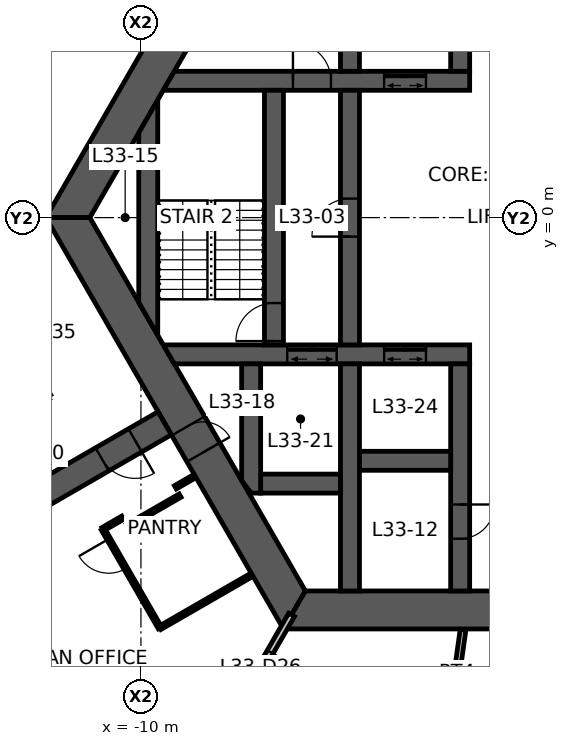
"""IFC4 building model, lengths in metres.
Left out: names, types, materials, properties, quantities, classifications, styles, units other than length and angle.
Written with IfcOpenShell. Run it as: python <this file> out.ifc"""

import sys

from ifc_helpers import new_model, si_unit, direction, frame, frame_2d, origin, place, context, subcontext, project, spatial, polyline, rectangle, outline, extrude, element, fill, save


model = new_model("IFC4")
c1 = context("Model", 3, precision=1e-05, world=origin(), true_north=direction((0.0, 1.0)))
c2 = subcontext(c1, "Body", "Model", "MODEL_VIEW")
j1 = project(units=[si_unit("LENGTHUNIT", "METRE"), si_unit("PLANEANGLEUNIT", "RADIAN")], contexts=[c1])
p1 = place(None, origin())
s1 = spatial("IfcSite", under=j1, at=p1, CompositionType="ELEMENT")
p2 = place(p1, origin())
s2 = spatial("IfcBuilding", under=s1, at=p2, CompositionType="ELEMENT")
p3 = place(p2, frame((0.0, 0.0, 133.1)))
s3 = spatial("IfcBuildingStorey", under=s2, at=p3, CompositionType="ELEMENT", Elevation=133.1)
p4 = place(p3, frame((-5.961, 10.325, 0.0), z_axis=(0.0, 0.0, 1.0), x_axis=(-0.500004296715, -0.866022923061, 0.0)))
e1 = element("IfcWall", 1, at=p4, inside=s3, PredefinedType="SHEAR", context=c2, shape_type="SweptSolid", body=[
    extrude(outline(polyline([(-0.289, -0.5), (4.494, -0.5), (5.494, -0.5), (12.211, -0.5), (11.634, 0.5), (5.494, 0.5), (4.494, 0.5), (0.289, 0.5), (-0.289, -0.5)])), origin(), (0.0, 0.0, 1.0), 3.9),
])
p5 = place(p4, frame((4.494, 0.0, 0.0)))
e2 = element("IfcOpeningElement", 2, at=p5, cuts=e1, PredefinedType="OPENING", context=c2, shape_type="SweptSolid", body=[
    extrude(rectangle(XDim=1.0, YDim=2.1, at=frame_2d((0.5, 1.05))), frame((0.0, 0.51, 0.0), z_axis=(0.0, -1.0, 0.0), x_axis=(1.0, 0.0, 0.0)), (0.0, 0.0, 1.0), 1.02),
])
p6 = place(p3, frame((-11.922, 0.0, 0.0), z_axis=(0.0, 0.0, 1.0), x_axis=(0.500004296715, -0.866022923061, 0.0)))
e3 = element("IfcWall", 3, at=p6, inside=s3, PredefinedType="SHEAR", context=c2, shape_type="SweptSolid", body=[
    extrude(outline(polyline([(-0.289, -0.5), (6.331, -0.5), (7.131, -0.5), (12.211, -0.5), (11.634, 0.5), (7.131, 0.5), (6.331, 0.5), (0.289, 0.5), (-0.289, -0.5)])), origin(), (0.0, 0.0, 1.0), 3.9),
])
p7 = place(p6, frame((6.331, 0.0, 0.0)))
e4 = element("IfcOpeningElement", 4, at=p7, cuts=e3, PredefinedType="OPENING", context=c2, shape_type="SweptSolid", body=[
    extrude(rectangle(XDim=0.8, YDim=2.1, at=frame_2d((0.4, 1.05))), frame((0.0, 0.51, 0.0), z_axis=(0.0, -1.0, 0.0), x_axis=(1.0, 0.0, 0.0)), (0.0, 0.0, 1.0), 1.02),
])
p8 = place(p3, frame((-5.961, -10.325, 0.0), z_axis=(0.0, 0.0, 1.0), x_axis=(1.0, 0.0, 0.0)))
e5 = element("IfcWall", 5, at=p8, inside=s3, PredefinedType="SHEAR", context=c2, shape_type="SweptSolid", body=[
    extrude(outline(polyline([(-0.289, -0.5), (5.461, -0.5), (6.461, -0.5), (12.211, -0.5), (11.634, 0.5), (6.461, 0.5), (5.461, 0.5), (0.289, 0.5), (-0.289, -0.5)])), origin(), (0.0, 0.0, 1.0), 3.9),
])
p9 = place(p8, frame((5.461, 0.0, 0.0)))
e6 = element("IfcOpeningElement", 6, at=p9, cuts=e5, PredefinedType="OPENING", context=c2, shape_type="SweptSolid", body=[
    extrude(rectangle(XDim=1.0, YDim=2.1, at=frame_2d((0.5, 1.05))), frame((0.0, 0.51, 0.0), z_axis=(0.0, -1.0, 0.0), x_axis=(1.0, 0.0, 0.0)), (0.0, 0.0, 1.0), 1.02),
])
p10 = place(p3, frame((-9.375, -5.413, 0.0), z_axis=(0.0, 0.0, 1.0), x_axis=(-0.866032377459, -0.499987921047, 0.0)))
e7 = element("IfcWall", 7, at=p10, inside=s3, PredefinedType="SHEAR", context=c2, shape_type="SweptSolid", body=[
    extrude(rectangle(XDim=7.696, YDim=0.7, at=frame_2d((3.848, 0.0))), origin(), (0.0, 0.0, 1.0), 3.9),
])
p11 = place(p10, frame((0.9, 0.0, 0.0)))
e8 = element("IfcOpeningElement", 8, at=p11, cuts=e7, PredefinedType="OPENING", context=c2, shape_type="SweptSolid", body=[
    extrude(rectangle(XDim=1.0, YDim=2.1, at=frame_2d((0.5, 1.05))), frame((0.0, 0.36, 0.0), z_axis=(0.0, -1.0, 0.0), x_axis=(1.0, 0.0, 0.0)), (0.0, 0.0, 1.0), 0.72),
])
p12 = place(p3, frame((-9.266, 3.6, 0.0), z_axis=(0.0, 0.0, 1.0), x_axis=(1.0, 0.0, 0.0)))
e9 = element("IfcWall", 9, at=p12, inside=s3, PredefinedType="SHEAR", context=c2, shape_type="SweptSolid", body=[
    extrude(outline(polyline([(-0.144, -0.25), (3.266, -0.25), (4.266, -0.25), (5.667, -0.25), (6.767, -0.25), (7.916, -0.25), (7.916, 0.25), (6.767, 0.25), (5.667, 0.25), (4.266, 0.25), (3.266, 0.25), (0.144, 0.25), (-0.144, -0.25)])), origin(), (0.0, 0.0, 1.0), 3.9),
])
p13 = place(p12, frame((3.266, 0.0, 0.0)))
e10 = element("IfcOpeningElement", 10, at=p13, cuts=e9, PredefinedType="OPENING", context=c2, shape_type="SweptSolid", body=[
    extrude(rectangle(XDim=1.0, YDim=2.1, at=frame_2d((0.5, 1.05))), frame((0.0, 0.26, 0.0), z_axis=(0.0, -1.0, 0.0), x_axis=(1.0, 0.0, 0.0)), (0.0, 0.0, 1.0), 0.52),
])
p14 = place(p12, frame((5.667, 0.0, 0.0)))
e11 = element("IfcOpeningElement", 11, at=p14, cuts=e9, PredefinedType="OPENING", context=c2, shape_type="SweptSolid", body=[
    extrude(rectangle(XDim=1.1, YDim=2.1, at=frame_2d((0.55, 1.05))), frame((0.0, 0.26, 0.0), z_axis=(0.0, -1.0, 0.0), x_axis=(1.0, 0.0, 0.0)), (0.0, 0.0, 1.0), 0.52),
])
p15 = place(p3, frame((-9.266, -3.6, 0.0), z_axis=(0.0, 0.0, 1.0), x_axis=(1.0, 0.0, 0.0)))
e12 = element("IfcWall", 12, at=p15, inside=s3, PredefinedType="SHEAR", context=c2, shape_type="SweptSolid", body=[
    extrude(outline(polyline([(0.144, -0.25), (3.116, -0.25), (4.417, -0.25), (5.667, -0.25), (6.767, -0.25), (7.916, -0.25), (7.916, 0.25), (6.767, 0.25), (5.667, 0.25), (4.417, 0.25), (3.116, 0.25), (-0.144, 0.25), (0.144, -0.25)])), origin(), (0.0, 0.0, 1.0), 3.9),
])
p16 = place(p15, frame((5.667, 0.0, 0.0)))
e13 = element("IfcOpeningElement", 13, at=p16, cuts=e12, PredefinedType="OPENING", context=c2, shape_type="SweptSolid", body=[
    extrude(rectangle(XDim=1.1, YDim=2.1, at=frame_2d((0.55, 1.05))), frame((0.0, 0.26, 0.0), z_axis=(0.0, -1.0, 0.0), x_axis=(1.0, 0.0, 0.0)), (0.0, 0.0, 1.0), 0.52),
])
p17 = place(p15, frame((3.116, 0.0, 0.0)))
e14 = element("IfcOpeningElement", 14, at=p17, cuts=e12, PredefinedType="OPENING", context=c2, shape_type="SweptSolid", body=[
    extrude(rectangle(XDim=1.3, YDim=2.1, at=frame_2d((0.65, 1.05))), frame((0.0, 0.26, 0.0), z_axis=(0.0, -1.0, 0.0), x_axis=(1.0, 0.0, 0.0)), (0.0, 0.0, 1.0), 0.52),
])
p18 = place(p3, frame((-1.6, 3.85, 0.0), z_axis=(0.0, 0.0, 1.0), x_axis=(0.0, 1.0, 0.0)))
e15 = element("IfcWall", 15, at=p18, inside=s3, PredefinedType="SHEAR", context=c2, shape_type="SweptSolid", body=[
    extrude(rectangle(XDim=5.975, YDim=0.5, at=frame_2d((2.987, 0.0))), origin(), (0.0, 0.0, 1.0), 3.9),
])
p19 = place(p18, frame((3.7, 0.0, 0.0)))
e16 = element("IfcOpeningElement", 16, at=p19, cuts=e15, PredefinedType="OPENING", context=c2, shape_type="SweptSolid", body=[
    extrude(rectangle(XDim=0.9, YDim=2.1, at=frame_2d((0.45, 1.05))), frame((0.0, 0.26, 0.0), z_axis=(0.0, -1.0, 0.0), x_axis=(1.0, 0.0, 0.0)), (0.0, 0.0, 1.0), 0.52),
])
p20 = place(p3, frame((-1.6, -3.85, 0.0), z_axis=(0.0, 0.0, 1.0), x_axis=(0.0, -1.0, 0.0)))
e17 = element("IfcWall", 17, at=p20, inside=s3, PredefinedType="SHEAR", context=c2, shape_type="SweptSolid", body=[
    extrude(rectangle(XDim=5.975, YDim=0.5, at=frame_2d((2.987, 0.0))), origin(), (0.0, 0.0, 1.0), 3.9),
])
p21 = place(p20, frame((3.7, 0.0, 0.0)))
e18 = element("IfcOpeningElement", 18, at=p21, cuts=e17, PredefinedType="OPENING", context=c2, shape_type="SweptSolid", body=[
    extrude(rectangle(XDim=0.9, YDim=2.1, at=frame_2d((0.45, 1.05))), frame((0.0, 0.26, 0.0), z_axis=(0.0, -1.0, 0.0), x_axis=(1.0, 0.0, 0.0)), (0.0, 0.0, 1.0), 0.52),
])
p22 = place(p3, frame((-4.5, -3.35, 0.0), z_axis=(0.0, 0.0, 1.0), x_axis=(0.0, 1.0, 0.0)))
e19 = element("IfcWall", 19, at=p22, inside=s3, PredefinedType="SHEAR", context=c2, shape_type="SweptSolid", body=[
    extrude(rectangle(XDim=6.7, YDim=0.5, at=frame_2d((3.35, 0.0))), origin(), (0.0, 0.0, 1.0), 3.9),
])
p23 = place(p22, frame((2.85, 0.0, 0.0)))
e20 = element("IfcOpeningElement", 20, at=p23, cuts=e19, PredefinedType="OPENING", context=c2, shape_type="SweptSolid", body=[
    extrude(rectangle(XDim=1.0, YDim=2.1, at=frame_2d((0.5, 1.05))), frame((0.0, 0.26, 0.0), z_axis=(0.0, -1.0, 0.0), x_axis=(1.0, 0.0, 0.0)), (0.0, 0.0, 1.0), 0.52),
])
p24 = place(p3, frame((-6.5, -3.35, 0.0), z_axis=(0.0, 0.0, 1.0), x_axis=(0.0, 1.0, 0.0)))
e21 = element("IfcWall", 21, at=p24, inside=s3, PredefinedType="SHEAR", context=c2, shape_type="SweptSolid", body=[
    extrude(rectangle(XDim=6.7, YDim=0.5, at=frame_2d((3.35, 0.0))), origin(), (0.0, 0.0, 1.0), 3.9),
])
p25 = place(p24, frame((0.1, 0.0, 0.0)))
e22 = element("IfcOpeningElement", 22, at=p25, cuts=e21, PredefinedType="OPENING", context=c2, shape_type="SweptSolid", body=[
    extrude(rectangle(XDim=1.0, YDim=2.1, at=frame_2d((0.5, 1.05))), frame((0.0, 0.26, 0.0), z_axis=(0.0, -1.0, 0.0), x_axis=(1.0, 0.0, 0.0)), (0.0, 0.0, 1.0), 0.52),
])
for number, where, z_axis, x_axis in (
    (23, (-4.5, 3.85, 0.0), (0.0, 0.0, 1.0), (0.0, 1.0, 0.0)),
    (24, (-4.5, -3.85, 0.0), (0.0, 0.0, 1.0), (0.0, -1.0, 0.0)),
):
    element("IfcWall", number, at=place(p3, frame(where, z_axis=z_axis, x_axis=x_axis)), inside=s3, PredefinedType="SHEAR", context=c2, shape_type="SweptSolid", body=[
        extrude(rectangle(XDim=5.975, YDim=0.5, at=frame_2d((2.987, 0.0))), origin(), (0.0, 0.0, 1.0), 3.9),
    ])
p26 = place(p3, frame((-4.25, -6.4, 0.0), z_axis=(0.0, 0.0, 1.0), x_axis=(1.0, 0.0, 0.0)))
e25 = element("IfcWall", 25, at=p26, inside=s3, PredefinedType="SHEAR", context=c2, shape_type="SweptSolid", body=[
    extrude(rectangle(XDim=2.4, YDim=0.5, at=frame_2d((1.2, 0.0))), origin(), (0.0, 0.0, 1.0), 3.9),
])
p27 = place(p3, frame((-6.85, -7.0, 0.0), z_axis=(0.0, 0.0, 1.0), x_axis=(1.0, 0.0, 0.0)))
e26 = element("IfcWall", 26, at=p27, inside=s3, PredefinedType="SHEAR", context=c2, shape_type="SweptSolid", body=[
    extrude(rectangle(XDim=2.1, YDim=0.5, at=frame_2d((1.05, 0.0))), origin(), (0.0, 0.0, 1.0), 3.9),
])
p28 = place(p3, frame((-7.1, -3.85, 0.0), z_axis=(0.0, 0.0, 1.0), x_axis=(0.0, -1.0, 0.0)))
e27 = element("IfcWall", 27, at=p28, inside=s3, PredefinedType="SHEAR", context=c2, shape_type="SweptSolid", body=[
    extrude(outline(polyline([(0.0, -0.25), (3.069, -0.25), (3.4, 0.0), (3.4, 0.25), (0.0, 0.25), (0.0, -0.25)])), origin(), (0.0, 0.0, 1.0), 3.9),
])
p29 = place(p3, frame((-9.808, -2.662, 0.0), z_axis=(0.0, 0.0, 1.0), x_axis=(0.0, 1.0, 0.0)))
e28 = element("IfcWall", 28, at=p29, inside=s3, PredefinedType="SHEAR", context=c2, shape_type="SweptSolid", body=[
    extrude(outline(polyline([(-0.433, -0.25), (5.758, -0.25), (4.892, 0.25), (0.433, 0.25), (-0.433, -0.25)])), origin(), (0.0, 0.0, 1.0), 3.9),
])
p30 = place(p3, frame((-6.035, -10.453, 0.0), z_axis=(0.0, 0.0, 1.0), x_axis=(-0.499989830942, -0.866031274813, 0.0)))
e29 = element("IfcWall", 29, at=p30, inside=s3, PredefinedType="PARTITIONING", context=c2, shape_type="SweptSolid", body=[
    extrude(rectangle(XDim=7.93, YDim=0.175, at=frame_2d((3.965, 0.0))), origin(), (0.0, 0.0, 1.0), 3.05),
])
p31 = place(p30, frame((1.13, 0.0, 0.0)))
e30 = element("IfcOpeningElement", 30, at=p31, cuts=e29, PredefinedType="OPENING", context=c2, shape_type="SweptSolid", body=[
    extrude(rectangle(XDim=1.0, YDim=2.1, at=frame_2d((0.5, 1.05))), frame((0.0, 0.098, 0.0), z_axis=(0.0, -1.0, 0.0), x_axis=(1.0, 0.0, 0.0)), (0.0, 0.0, 1.0), 0.195),
])
p32 = place(p3, frame((-12.908, 3.893, 0.0), z_axis=(0.0, 0.0, 1.0), x_axis=(0.500006411147, 0.866021702275, 0.0)))
e31 = element("IfcWall", 31, at=p32, inside=s3, PredefinedType="PARTITIONING", context=c2, shape_type="SweptSolid", body=[
    extrude(rectangle(XDim=7.095, YDim=0.15, at=frame_2d((3.548, 0.0))), origin(), (0.0, 0.0, 1.0), 2.95),
])
p33 = place(p32, frame((3.047, 0.0, 0.0)))
e32 = element("IfcOpeningElement", 32, at=p33, cuts=e31, PredefinedType="OPENING", context=c2, shape_type="SweptSolid", body=[
    extrude(rectangle(XDim=1.0, YDim=2.1, at=frame_2d((0.5, 1.05))), frame((0.0, 0.085, 0.0), z_axis=(0.0, -1.0, 0.0), x_axis=(1.0, 0.0, 0.0)), (0.0, 0.0, 1.0), 0.17),
])
p34 = place(p3, frame((-11.0, -8.198, 0.0), z_axis=(0.0, 0.0, 1.0), x_axis=(0.866131372301, 0.499816412211, 0.0)))
e33 = element("IfcWall", 33, at=p34, inside=s3, PredefinedType="PARTITIONING", context=c2, shape_type="SweptSolid", body=[
    extrude(rectangle(XDim=0.6, YDim=0.1, at=frame_2d((0.3, 0.0))), origin(), (0.0, 0.0, 1.0), 2.95),
])
p35 = place(p3, frame((-10.355, -8.115, 0.0), z_axis=(0.0, 0.0, 1.0), x_axis=(0.866094119867, 0.499880961361, 0.0)))
e34 = element("IfcWall", 34, at=p35, inside=s3, PredefinedType="PARTITIONING", context=c2, shape_type="SweptSolid", body=[
    extrude(rectangle(XDim=1.6, YDim=0.1, at=frame_2d((0.8, 0.0))), origin(), (0.0, 0.0, 1.0), 2.95),
])
p36 = place(p3, frame((-9.5, -10.796, 0.0), z_axis=(0.0, 0.0, 1.0), x_axis=(-0.499990139034, 0.866031096941, 0.0)))
e35 = element("IfcWall", 35, at=p36, inside=s3, PredefinedType="PARTITIONING", context=c2, shape_type="SweptSolid", body=[
    extrude(rectangle(XDim=3.0, YDim=0.1, at=frame_2d((1.5, 0.0))), origin(), (0.0, 0.0, 1.0), 2.95),
])
p37 = place(p36, frame((1.8, 0.0, 0.0)))
e36 = element("IfcOpeningElement", 36, at=p37, cuts=e35, PredefinedType="OPENING", context=c2, shape_type="SweptSolid", body=[
    extrude(rectangle(XDim=0.9, YDim=2.1, at=frame_2d((0.45, 1.05))), frame((0.0, 0.06, 0.0), z_axis=(0.0, -1.0, 0.0), x_axis=(1.0, 0.0, 0.0)), (0.0, 0.0, 1.0), 0.12),
])
p38 = place(p3, frame((-9.094, -7.098, 0.0), z_axis=(0.0, 0.0, 1.0), x_axis=(0.865954211699, 0.50012328804, 0.0)))
e37 = element("IfcWall", 37, at=p38, inside=s3, PredefinedType="PARTITIONING", context=c2, shape_type="SweptSolid", body=[
    extrude(rectangle(XDim=0.58, YDim=0.1, at=frame_2d((0.29, 0.0))), origin(), (0.0, 0.0, 1.0), 2.95),
])
p39 = place(p3, frame((-7.092, -9.406, 0.0), z_axis=(0.0, 0.0, 1.0), x_axis=(-0.86603494908, -0.499983466698, 0.0)))
e38 = element("IfcWall", 38, at=p39, inside=s3, PredefinedType="PARTITIONING", context=c2, shape_type="SweptSolid", body=[
    extrude(rectangle(XDim=2.78, YDim=0.1, at=frame_2d((1.39, 0.0))), origin(), (0.0, 0.0, 1.0), 2.95),
])
p40 = place(p3, frame((-1.844, -13.125, 0.0), z_axis=(0.0, 0.0, 1.0), x_axis=(0.139119980631, 0.990275532864, 0.0)))
e39 = element("IfcWall", 39, at=p40, inside=s3, PredefinedType="PARTITIONING", context=c2, shape_type="SweptSolid", body=[
    extrude(rectangle(XDim=2.302, YDim=0.15, at=frame_2d((1.151, 0.0))), origin(), (0.0, 0.0, 1.0), 2.95),
])
p41 = place(p7, origin())
e40 = element("IfcDoor", 40, at=p41, inside=s3, OperationType="SINGLE_SWING_RIGHT", PredefinedType="DOOR", context=c2, shape_type="SweptSolid", body=[
    extrude(rectangle(XDim=0.8, YDim=2.1, at=frame_2d((0.4, 1.05))), frame((0.0, 0.025, 0.0), z_axis=(0.0, -1.0, 0.0), x_axis=(1.0, 0.0, 0.0)), (0.0, 0.0, 1.0), 0.05),
])
fill(e4, e40)
p42 = place(p23, origin())
e41 = element("IfcDoor", 41, at=p42, inside=s3, OperationType="SINGLE_SWING_LEFT", PredefinedType="DOOR", context=c2, shape_type="SweptSolid", body=[
    extrude(rectangle(XDim=1.0, YDim=2.1, at=frame_2d((0.5, 1.05))), frame((0.0, 0.025, 0.0), z_axis=(0.0, -1.0, 0.0), x_axis=(1.0, 0.0, 0.0)), (0.0, 0.0, 1.0), 0.05),
])
fill(e20, e41)
p43 = place(p25, origin())
e42 = element("IfcDoor", 42, at=p43, inside=s3, OperationType="SINGLE_SWING_LEFT", PredefinedType="DOOR", context=c2, shape_type="SweptSolid", body=[
    extrude(rectangle(XDim=1.0, YDim=2.1, at=frame_2d((0.5, 1.05))), frame((0.0, 0.025, 0.0), z_axis=(0.0, -1.0, 0.0), x_axis=(1.0, 0.0, 0.0)), (0.0, 0.0, 1.0), 0.05),
])
fill(e22, e42)
p44 = place(p13, origin())
e43 = element("IfcDoor", 43, at=p44, inside=s3, OperationType="SINGLE_SWING_LEFT", PredefinedType="DOOR", context=c2, shape_type="SweptSolid", body=[
    extrude(rectangle(XDim=1.0, YDim=2.1, at=frame_2d((0.5, 1.05))), frame((0.0, 0.025, 0.0), z_axis=(0.0, -1.0, 0.0), x_axis=(1.0, 0.0, 0.0)), (0.0, 0.0, 1.0), 0.05),
])
fill(e10, e43)
p45 = place(p21, origin())
e44 = element("IfcDoor", 44, at=p45, inside=s3, OperationType="SINGLE_SWING_LEFT", PredefinedType="DOOR", context=c2, shape_type="SweptSolid", body=[
    extrude(rectangle(XDim=0.9, YDim=2.1, at=frame_2d((0.45, 1.05))), frame((0.0, 0.025, 0.0), z_axis=(0.0, -1.0, 0.0), x_axis=(1.0, 0.0, 0.0)), (0.0, 0.0, 1.0), 0.05),
])
fill(e18, e44)
p46 = place(p11, origin())
e45 = element("IfcDoor", 45, at=p46, inside=s3, OperationType="SINGLE_SWING_LEFT", PredefinedType="DOOR", context=c2, shape_type="SweptSolid", body=[
    extrude(rectangle(XDim=1.0, YDim=2.1, at=frame_2d((0.5, 1.05))), frame((0.0, 0.025, 0.0), z_axis=(0.0, -1.0, 0.0), x_axis=(1.0, 0.0, 0.0)), (0.0, 0.0, 1.0), 0.05),
])
fill(e8, e45)
p47 = place(p31, origin())
e46 = element("IfcDoor", 46, at=p47, inside=s3, OperationType="SINGLE_SWING_LEFT", PredefinedType="DOOR", context=c2, shape_type="SweptSolid", body=[
    extrude(rectangle(XDim=1.0, YDim=2.1, at=frame_2d((0.5, 1.05))), frame((0.0, 0.025, 0.0), z_axis=(0.0, -1.0, 0.0), x_axis=(1.0, 0.0, 0.0)), (0.0, 0.0, 1.0), 0.05),
])
fill(e30, e46)
p48 = place(p37, origin())
e47 = element("IfcDoor", 47, at=p48, inside=s3, OperationType="SINGLE_SWING_RIGHT", PredefinedType="DOOR", context=c2, shape_type="SweptSolid", body=[
    extrude(rectangle(XDim=0.9, YDim=2.1, at=frame_2d((0.45, 1.05))), frame((0.0, 0.025, 0.0), z_axis=(0.0, -1.0, 0.0), x_axis=(1.0, 0.0, 0.0)), (0.0, 0.0, 1.0), 0.05),
])
fill(e36, e47)
p49 = place(p14, origin())
e48 = element("IfcDoor", 48, at=p49, inside=s3, OperationType="DOUBLE_DOOR_SLIDING", PredefinedType="DOOR", context=c2, shape_type="SweptSolid", body=[
    extrude(rectangle(XDim=1.1, YDim=2.1, at=frame_2d((0.55, 1.05))), frame((0.0, 0.025, 0.0), z_axis=(0.0, -1.0, 0.0), x_axis=(1.0, 0.0, 0.0)), (0.0, 0.0, 1.0), 0.05),
])
fill(e11, e48)
p50 = place(p16, origin())
e49 = element("IfcDoor", 49, at=p50, inside=s3, OperationType="DOUBLE_DOOR_SLIDING", PredefinedType="DOOR", context=c2, shape_type="SweptSolid", body=[
    extrude(rectangle(XDim=1.1, YDim=2.1, at=frame_2d((0.55, 1.05))), frame((0.0, 0.025, 0.0), z_axis=(0.0, -1.0, 0.0), x_axis=(1.0, 0.0, 0.0)), (0.0, 0.0, 1.0), 0.05),
])
fill(e13, e49)
p51 = place(p17, origin())
e50 = element("IfcDoor", 50, at=p51, inside=s3, OperationType="DOUBLE_DOOR_SLIDING", PredefinedType="DOOR", context=c2, shape_type="SweptSolid", body=[
    extrude(rectangle(XDim=1.3, YDim=2.1, at=frame_2d((0.65, 1.05))), frame((0.0, 0.025, 0.0), z_axis=(0.0, -1.0, 0.0), x_axis=(1.0, 0.0, 0.0)), (0.0, 0.0, 1.0), 0.05),
])
fill(e14, e50)
save(model, sys.argv[1])
